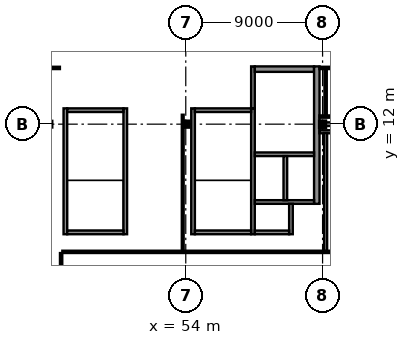
"""IFC4 building model, lengths in metres.
Left out: names, types, materials, properties, quantities, classifications, styles, units other than length and angle.
Written with IfcOpenShell. Run it as: python <this file> out.ifc"""

import sys

from ifc_helpers import new_model, si_unit, direction, frame, frame_2d, origin, origin_2d, place, context, subcontext, project, spatial, rectangle, i_section, extrude, element, fill, save


model = new_model("IFC4")
c1 = context("Model", 3, precision=1e-05, world=origin(), true_north=direction((0.0, 1.0)))
c2 = subcontext(c1, "Body", "Model", "MODEL_VIEW")
j1 = project(units=[si_unit("LENGTHUNIT", "METRE"), si_unit("PLANEANGLEUNIT", "RADIAN")], contexts=[c1])
p1 = place(None, origin())
s1 = spatial("IfcSite", under=j1, at=p1, CompositionType="ELEMENT")
p2 = place(p1, origin())
s2 = spatial("IfcBuilding", under=s1, at=p2, CompositionType="ELEMENT")
p3 = place(p2, frame((0.0, 0.0, 27.4)))
s3 = spatial("IfcBuildingStorey", under=s2, at=p3, CompositionType="ELEMENT", Elevation=27.4)
p4 = place(p3, frame((54.0, 12.0, 0.0), z_axis=(0.0, 0.0, 1.0), x_axis=(1.0, 0.0, 0.0)))
e1 = element("IfcColumn", 1, at=p4, inside=s3, PredefinedType="COLUMN", context=c2, shape_type="SweptSolid", body=[
    extrude(i_section(OverallWidth=0.3, OverallDepth=0.3, WebThickness=0.011, FlangeThickness=0.019, at=origin_2d()), origin(), (0.0, 0.0, 1.0), 4.0),
])
p5 = place(p3, frame((63.0, 12.0, 0.0), z_axis=(0.0, 0.0, 1.0), x_axis=(1.0, 0.0, 0.0)))
e2 = element("IfcColumn", 2, at=p5, inside=s3, PredefinedType="COLUMN", context=c2, shape_type="SweptSolid", body=[
    extrude(i_section(OverallWidth=0.3, OverallDepth=0.32, WebThickness=0.011, FlangeThickness=0.021, at=origin_2d()), origin(), (0.0, 0.0, 1.0), 4.0),
])
p6 = place(p3, frame((54.48, 4.76, 0.0), z_axis=(0.0, 0.0, 1.0), x_axis=(0.0, 1.0, 0.0)))
e3 = element("IfcWall", 3, at=p6, inside=s3, PredefinedType="SHEAR", context=c2, shape_type="SweptSolid", body=[
    extrude(rectangle(XDim=8.28, YDim=0.24, at=frame_2d((4.14, 0.0))), origin(), (0.0, 0.0, 1.0), 3.81),
])
p7 = place(p3, frame((58.42, 4.76, 0.0), z_axis=(0.0, 0.0, 1.0), x_axis=(0.0, 1.0, 0.0)))
e4 = element("IfcWall", 4, at=p7, inside=s3, PredefinedType="SHEAR", context=c2, shape_type="SweptSolid", body=[
    extrude(rectangle(XDim=8.28, YDim=0.24, at=frame_2d((4.14, 0.0))), origin(), (0.0, 0.0, 1.0), 3.81),
])
p8 = place(p7, frame((6.49, 0.0, 0.0)))
e5 = element("IfcOpeningElement", 5, at=p8, cuts=e4, PredefinedType="OPENING", context=c2, shape_type="SweptSolid", body=[
    extrude(rectangle(XDim=1.3, YDim=2.2, at=frame_2d((0.65, 1.1))), frame((0.0, 0.135, 0.0), z_axis=(0.0, -1.0, 0.0), x_axis=(1.0, 0.0, 0.0)), (0.0, 0.0, 1.0), 0.27),
])
for number, where, z_axis, x_axis in (
    (6, (54.6, 4.88, 0.0), (0.0, 0.0, 1.0), (1.0, 0.0, 0.0)),
    (7, (54.6, 12.92, 0.0), (0.0, 0.0, 1.0), (1.0, 0.0, 0.0)),
):
    element("IfcWall", number, at=place(p3, frame(where, z_axis=z_axis, x_axis=x_axis)), inside=s3, PredefinedType="SHEAR", context=c2, shape_type="SweptSolid", body=[
        extrude(rectangle(XDim=3.7, YDim=0.24, at=frame_2d((1.85, 0.0))), origin(), (0.0, 0.0, 1.0), 3.81),
    ])
p9 = place(p3, frame((46.08, 4.76, 0.0), z_axis=(0.0, 0.0, 1.0), x_axis=(0.0, 1.0, 0.0)))
e8 = element("IfcWall", 8, at=p9, inside=s3, PredefinedType="SHEAR", context=c2, shape_type="SweptSolid", body=[
    extrude(rectangle(XDim=8.28, YDim=0.24, at=frame_2d((4.14, 0.0))), origin(), (0.0, 0.0, 1.0), 3.81),
])
p10 = place(p3, frame((50.02, 4.76, 0.0), z_axis=(0.0, 0.0, 1.0), x_axis=(0.0, 1.0, 0.0)))
e9 = element("IfcWall", 9, at=p10, inside=s3, PredefinedType="SHEAR", context=c2, shape_type="SweptSolid", body=[
    extrude(rectangle(XDim=8.28, YDim=0.24, at=frame_2d((4.14, 0.0))), origin(), (0.0, 0.0, 1.0), 3.81),
])
p11 = place(p10, frame((6.49, 0.0, 0.0)))
e10 = element("IfcOpeningElement", 10, at=p11, cuts=e9, PredefinedType="OPENING", context=c2, shape_type="SweptSolid", body=[
    extrude(rectangle(XDim=1.3, YDim=2.2, at=frame_2d((0.65, 1.1))), frame((0.0, 0.135, 0.0), z_axis=(0.0, -1.0, 0.0), x_axis=(1.0, 0.0, 0.0)), (0.0, 0.0, 1.0), 0.27),
])
for number, where, z_axis, x_axis in (
    (11, (46.2, 4.88, 0.0), (0.0, 0.0, 1.0), (1.0, 0.0, 0.0)),
    (12, (46.2, 12.92, 0.0), (0.0, 0.0, 1.0), (1.0, 0.0, 0.0)),
):
    element("IfcWall", number, at=place(p3, frame(where, z_axis=z_axis, x_axis=x_axis)), inside=s3, PredefinedType="SHEAR", context=c2, shape_type="SweptSolid", body=[
        extrude(rectangle(XDim=3.7, YDim=0.24, at=frame_2d((1.85, 0.0))), origin(), (0.0, 0.0, 1.0), 3.81),
    ])
p12 = place(p3, frame((58.42, 13.04, 0.0), z_axis=(0.0, 0.0, 1.0), x_axis=(0.0, 1.0, 0.0)))
e13 = element("IfcWall", 13, at=p12, inside=s3, PredefinedType="SHEAR", context=c2, shape_type="SweptSolid", body=[
    extrude(rectangle(XDim=2.76, YDim=0.24, at=frame_2d((1.38, 0.0))), origin(), (0.0, 0.0, 1.0), 3.66),
])
p13 = place(p3, frame((58.54, 15.62, 0.0), z_axis=(0.0, 0.0, 1.0), x_axis=(1.0, 0.0, 0.0)))
e14 = element("IfcWall", 14, at=p13, inside=s3, PredefinedType="SHEAR", context=c2, shape_type="SweptSolid", body=[
    extrude(rectangle(XDim=3.9, YDim=0.36, at=frame_2d((1.95, 0.0))), origin(), (0.0, 0.0, 1.0), 3.66),
])
p14 = place(p13, frame((1.15, 0.0, 0.0)))
e15 = element("IfcOpeningElement", 15, at=p14, cuts=e14, PredefinedType="OPENING", context=c2, shape_type="SweptSolid", body=[
    extrude(rectangle(XDim=1.6, YDim=2.25, at=frame_2d((0.8, 1.125))), frame((0.0, 0.195, 0.0), z_axis=(0.0, -1.0, 0.0), x_axis=(1.0, 0.0, 0.0)), (0.0, 0.0, 1.0), 0.39),
])
p15 = place(p3, frame((62.62, 6.76, 0.0), z_axis=(0.0, 0.0, 1.0), x_axis=(0.0, 1.0, 0.0)))
e16 = element("IfcWall", 16, at=p15, inside=s3, PredefinedType="SHEAR", context=c2, shape_type="SweptSolid", body=[
    extrude(rectangle(XDim=9.04, YDim=0.36, at=frame_2d((4.52, 0.0))), origin(), (0.0, 0.0, 1.0), 3.66),
])
p16 = place(p3, frame((58.54, 10.02, 0.0), z_axis=(0.0, 0.0, 1.0), x_axis=(1.0, 0.0, 0.0)))
e17 = element("IfcWall", 17, at=p16, inside=s3, PredefinedType="SHEAR", context=c2, shape_type="SweptSolid", body=[
    extrude(rectangle(XDim=3.9, YDim=0.24, at=frame_2d((1.95, 0.0))), origin(), (0.0, 0.0, 1.0), 3.81),
])
p17 = place(p16, frame((0.235, 0.0, 0.0)))
e18 = element("IfcOpeningElement", 18, at=p17, cuts=e17, PredefinedType="OPENING", context=c2, shape_type="SweptSolid", body=[
    extrude(rectangle(XDim=1.6, YDim=2.3, at=frame_2d((0.8, 1.15))), frame((0.0, 0.135, 0.0), z_axis=(0.0, -1.0, 0.0), x_axis=(1.0, 0.0, 0.0)), (0.0, 0.0, 1.0), 0.27),
])
p18 = place(p16, frame((2.185, 0.0, 0.0)))
e19 = element("IfcOpeningElement", 19, at=p18, cuts=e17, PredefinedType="OPENING", context=c2, shape_type="SweptSolid", body=[
    extrude(rectangle(XDim=1.6, YDim=2.3, at=frame_2d((0.8, 1.15))), frame((0.0, 0.135, 0.0), z_axis=(0.0, -1.0, 0.0), x_axis=(1.0, 0.0, 0.0)), (0.0, 0.0, 1.0), 0.27),
])
p19 = place(p3, frame((58.54, 6.88, 0.0), z_axis=(0.0, 0.0, 1.0), x_axis=(1.0, 0.0, 0.0)))
e20 = element("IfcWall", 20, at=p19, inside=s3, PredefinedType="SHEAR", context=c2, shape_type="SweptSolid", body=[
    extrude(rectangle(XDim=3.9, YDim=0.24, at=frame_2d((1.95, 0.0))), origin(), (0.0, 0.0, 1.0), 3.81),
])
p20 = place(p3, frame((60.55, 7.0, 0.0), z_axis=(0.0, 0.0, 1.0), x_axis=(0.0, 1.0, 0.0)))
e21 = element("IfcWall", 21, at=p20, inside=s3, PredefinedType="SHEAR", context=c2, shape_type="SweptSolid", body=[
    extrude(rectangle(XDim=2.9, YDim=0.24, at=frame_2d((1.45, 0.0))), origin(), (0.0, 0.0, 1.0), 3.81),
])
p21 = place(p3, frame((60.92, 4.76, 0.0), z_axis=(0.0, 0.0, 1.0), x_axis=(0.0, 1.0, 0.0)))
e22 = element("IfcWall", 22, at=p21, inside=s3, PredefinedType="SHEAR", context=c2, shape_type="SweptSolid", body=[
    extrude(rectangle(XDim=2.0, YDim=0.24, at=frame_2d((1.0, 0.0))), origin(), (0.0, 0.0, 1.0), 3.81),
])
p22 = place(p3, frame((58.54, 4.88, 0.0), z_axis=(0.0, 0.0, 1.0), x_axis=(1.0, 0.0, 0.0)))
e23 = element("IfcWall", 23, at=p22, inside=s3, PredefinedType="SHEAR", context=c2, shape_type="SweptSolid", body=[
    extrude(rectangle(XDim=2.26, YDim=0.24, at=frame_2d((1.13, 0.0))), origin(), (0.0, 0.0, 1.0), 3.81),
])
p23 = place(p3, frame((63.008, 12.0, 0.0), z_axis=(0.0, 0.0, 1.0), x_axis=(1.0, 0.0, 0.0)))
e24 = element("IfcWall", 24, at=p23, inside=s3, PredefinedType="SHEAR", context=c2, shape_type="SweptSolid", body=[
    extrude(rectangle(XDim=8.854, YDim=0.24, at=frame_2d((4.427, 0.0))), origin(), (0.0, 0.0, 1.0), 3.355),
])
p24 = place(p3, frame((45.8, 0.135, 0.0), z_axis=(0.0, 0.0, 1.0), x_axis=(0.0, 1.0, 0.0)))
e25 = element("IfcWall", 25, at=p24, inside=s3, PredefinedType="PARTITIONING", context=c2, shape_type="SweptSolid", body=[
    extrude(rectangle(XDim=3.385, YDim=0.15, at=frame_2d((1.692, 0.0))), origin(), (0.0, 0.0, 1.0), 3.64),
])
p25 = place(p3, frame((45.88, 3.6, 0.0), z_axis=(0.0, 0.0, 1.0), x_axis=(1.0, 0.0, 0.0)))
e26 = element("IfcWall", 26, at=p25, inside=s3, PredefinedType="PARTITIONING", context=c2, shape_type="SweptSolid", body=[
    extrude(rectangle(XDim=58.24, YDim=0.15, at=frame_2d((29.12, 0.0))), origin(), (0.0, 0.0, 1.0), 3.64),
])
p26 = place(p25, frame((27.795, 0.0, 0.0)))
e27 = element("IfcOpeningElement", 27, at=p26, cuts=e26, PredefinedType="OPENING", context=c2, shape_type="SweptSolid", body=[
    extrude(rectangle(XDim=1.05, YDim=2.25, at=frame_2d((0.525, 1.125))), frame((0.0, 0.09, 0.0), z_axis=(0.0, -1.0, 0.0), x_axis=(1.0, 0.0, 0.0)), (0.0, 0.0, 1.0), 0.18),
])
p27 = place(p3, frame((53.8, 12.62, 0.0), z_axis=(0.0, 0.0, 1.0), x_axis=(0.0, -1.0, 0.0)))
e28 = element("IfcWall", 28, at=p27, inside=s3, PredefinedType="PARTITIONING", context=c2, shape_type="SweptSolid", body=[
    extrude(rectangle(XDim=8.95, YDim=0.12, at=frame_2d((4.475, 0.0))), origin(), (0.0, 0.0, 1.0), 3.405),
])
p28 = place(p3, frame((32.535, 15.7, 0.0), z_axis=(0.0, 0.0, 1.0), x_axis=(1.0, 0.0, 0.0)))
e29 = element("IfcWall", 29, at=p28, inside=s3, PredefinedType="PARTITIONING", context=c2, shape_type="SweptSolid", body=[
    extrude(rectangle(XDim=13.185, YDim=0.15, at=frame_2d((6.593, 0.0))), origin(), (0.0, 0.0, 1.0), 3.64),
])
p29 = place(p28, frame((6.068, 0.0, 0.0)))
e30 = element("IfcOpeningElement", 30, at=p29, cuts=e29, PredefinedType="OPENING", context=c2, shape_type="SweptSolid", body=[
    extrude(rectangle(XDim=1.05, YDim=2.25, at=frame_2d((0.525, 1.125))), frame((0.0, 0.09, 0.0), z_axis=(0.0, -1.0, 0.0), x_axis=(1.0, 0.0, 0.0)), (0.0, 0.0, 1.0), 0.18),
])
p30 = place(p3, frame((62.795, 11.5, 0.0), z_axis=(0.0, 0.0, 1.0), x_axis=(1.0, 0.0, 0.0)))
e31 = element("IfcWall", 31, at=p30, inside=s3, PredefinedType="PARTITIONING", context=c2, shape_type="SweptSolid", body=[
    extrude(rectangle(XDim=9.425, YDim=0.2, at=frame_2d((4.712, 0.0))), origin(), (0.0, 0.0, 1.0), 3.64),
])
p31 = place(p3, frame((63.2, 3.67, 0.0), z_axis=(0.0, 0.0, 1.0), x_axis=(0.0, 1.0, 0.0)))
e32 = element("IfcWall", 32, at=p31, inside=s3, PredefinedType="PARTITIONING", context=c2, shape_type="SweptSolid", body=[
    extrude(rectangle(XDim=7.75, YDim=0.2, at=frame_2d((3.875, 0.0))), origin(), (0.0, 0.0, 1.0), 3.355),
])
p32 = place(p3, frame((72.22, 12.5, 0.0), z_axis=(0.0, 0.0, 1.0), x_axis=(-1.0, 0.0, 0.0)))
e33 = element("IfcWall", 33, at=p32, inside=s3, PredefinedType="PARTITIONING", context=c2, shape_type="SweptSolid", body=[
    extrude(rectangle(XDim=9.425, YDim=0.15, at=frame_2d((4.712, 0.0))), origin(), (0.0, 0.0, 1.0), 3.64),
])
p33 = place(p3, frame((63.2, 12.57, 0.0), z_axis=(0.0, 0.0, 1.0), x_axis=(0.0, 1.0, 0.0)))
e34 = element("IfcWall", 34, at=p33, inside=s3, PredefinedType="PARTITIONING", context=c2, shape_type="SweptSolid", body=[
    extrude(rectangle(XDim=3.05, YDim=0.15, at=frame_2d((1.525, 0.0))), origin(), (0.0, 0.0, 1.0), 3.355),
])
p34 = place(p3, frame((62.795, 15.7, 0.0), z_axis=(0.0, 0.0, 1.0), x_axis=(1.0, 0.0, 0.0)))
e35 = element("IfcWall", 35, at=p34, inside=s3, PredefinedType="PARTITIONING", context=c2, shape_type="SweptSolid", body=[
    extrude(rectangle(XDim=9.425, YDim=0.15, at=frame_2d((4.712, 0.0))), origin(), (0.0, 0.0, 1.0), 3.64),
])
p35 = place(p34, frame((4.187, 0.0, 0.0)))
e36 = element("IfcOpeningElement", 36, at=p35, cuts=e35, PredefinedType="OPENING", context=c2, shape_type="SweptSolid", body=[
    extrude(rectangle(XDim=1.05, YDim=2.25, at=frame_2d((0.525, 1.125))), frame((0.0, 0.09, 0.0), z_axis=(0.0, -1.0, 0.0), x_axis=(1.0, 0.0, 0.0)), (0.0, 0.0, 1.0), 0.18),
])
p36 = place(p8, frame((1.3, 0.0, 0.0), z_axis=(0.0, 0.0, 1.0), x_axis=(-1.0, 0.0, 0.0)))
e37 = element("IfcDoor", 37, at=p36, inside=s3, OperationType="SINGLE_SWING_RIGHT", PredefinedType="DOOR", context=c2, shape_type="SweptSolid", body=[
    extrude(rectangle(XDim=1.3, YDim=2.2, at=frame_2d((0.65, 1.1))), frame((0.0, 0.025, 0.0), z_axis=(0.0, -1.0, 0.0), x_axis=(1.0, 0.0, 0.0)), (0.0, 0.0, 1.0), 0.05),
])
fill(e5, e37)
p37 = place(p11, frame((1.3, 0.0, 0.0), z_axis=(0.0, 0.0, 1.0), x_axis=(-1.0, 0.0, 0.0)))
e38 = element("IfcDoor", 38, at=p37, inside=s3, OperationType="SINGLE_SWING_RIGHT", PredefinedType="DOOR", context=c2, shape_type="SweptSolid", body=[
    extrude(rectangle(XDim=1.3, YDim=2.2, at=frame_2d((0.65, 1.1))), frame((0.0, 0.025, 0.0), z_axis=(0.0, -1.0, 0.0), x_axis=(1.0, 0.0, 0.0)), (0.0, 0.0, 1.0), 0.05),
])
fill(e10, e38)
p38 = place(p14, origin())
e39 = element("IfcDoor", 39, at=p38, inside=s3, OperationType="DOUBLE_DOOR_SINGLE_SWING", PredefinedType="DOOR", context=c2, shape_type="SweptSolid", body=[
    extrude(rectangle(XDim=1.6, YDim=2.25, at=frame_2d((0.8, 1.125))), frame((0.0, 0.025, 0.0), z_axis=(0.0, -1.0, 0.0), x_axis=(1.0, 0.0, 0.0)), (0.0, 0.0, 1.0), 0.05),
])
fill(e15, e39)
p39 = place(p17, origin())
e40 = element("IfcDoor", 40, at=p39, inside=s3, OperationType="DOUBLE_DOOR_SLIDING", PredefinedType="DOOR", context=c2, shape_type="SweptSolid", body=[
    extrude(rectangle(XDim=1.6, YDim=2.3, at=frame_2d((0.8, 1.15))), frame((0.0, 0.025, 0.0), z_axis=(0.0, -1.0, 0.0), x_axis=(1.0, 0.0, 0.0)), (0.0, 0.0, 1.0), 0.05),
])
fill(e18, e40)
p40 = place(p18, origin())
e41 = element("IfcDoor", 41, at=p40, inside=s3, OperationType="DOUBLE_DOOR_SLIDING", PredefinedType="DOOR", context=c2, shape_type="SweptSolid", body=[
    extrude(rectangle(XDim=1.6, YDim=2.3, at=frame_2d((0.8, 1.15))), frame((0.0, 0.025, 0.0), z_axis=(0.0, -1.0, 0.0), x_axis=(1.0, 0.0, 0.0)), (0.0, 0.0, 1.0), 0.05),
])
fill(e19, e41)
save(model, sys.argv[1])
